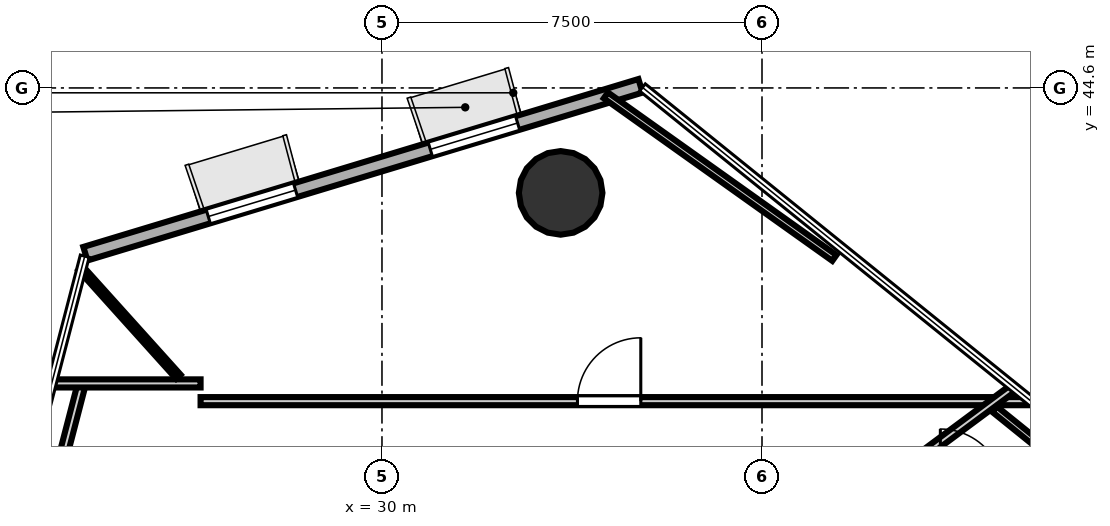
"""IFC4 building model, lengths in metres.
Left out: names, types, materials, properties, quantities, classifications, styles, units other than length and angle.
Written with IfcOpenShell. Run it as: python <this file> out.ifc"""

import sys

from ifc_helpers import new_model, si_unit, direction, frame, frame_2d, origin, origin_2d, place, context, subcontext, project, spatial, rectangle, hollow_circle, extrude, element, fill, save


model = new_model("IFC4")
c1 = context("Model", 3, precision=1e-05, world=origin(), true_north=direction((0.0, 1.0)))
c2 = subcontext(c1, "Body", "Model", "MODEL_VIEW")
j1 = project(units=[si_unit("LENGTHUNIT", "METRE"), si_unit("PLANEANGLEUNIT", "RADIAN")], contexts=[c1])
p1 = place(None, origin())
s1 = spatial("IfcSite", under=j1, at=p1, CompositionType="ELEMENT")
p2 = place(p1, origin())
s2 = spatial("IfcBuilding", under=s1, at=p2, CompositionType="ELEMENT")
p3 = place(p2, frame((0.0, 0.0, 82.1)))
s3 = spatial("IfcBuildingStorey", under=s2, at=p3, CompositionType="ELEMENT", Elevation=82.1)
p4 = place(p3, frame((33.526, 42.529, 0.0), z_axis=(0.0, 0.0, 1.0), x_axis=(1.0, 0.0, 0.0)))
e1 = element("IfcColumn", 1, at=p4, inside=s3, PredefinedType="COLUMN", context=c2, shape_type="SweptSolid", body=[
    extrude(hollow_circle(Radius=0.825, WallThickness=0.04, at=origin_2d()), origin(), (0.0, 0.0, 1.0), 3.7),
])
p5 = place(p3, frame((35.102, 44.642, 0.0), z_axis=(0.0, 0.0, 1.0), x_axis=(-0.957189300647, -0.289462679334, 0.0)))
e2 = element("IfcWall", 2, at=p5, inside=s3, PredefinedType="SOLIDWALL", context=c2, shape_type="SweptSolid", body=[
    extrude(rectangle(XDim=11.445, YDim=0.28, at=frame_2d((5.723, 0.0))), origin(), (0.0, 0.0, 1.0), 3.52),
])
p6 = place(p5, frame((2.534, 0.0, 0.85)))
e3 = element("IfcOpeningElement", 3, at=p6, cuts=e2, PredefinedType="OPENING", context=c2, shape_type="SweptSolid", body=[
    extrude(rectangle(XDim=1.8, YDim=2.1, at=frame_2d((0.9, 1.05))), frame((0.0, 0.15, 0.0), z_axis=(0.0, -1.0, 0.0), x_axis=(1.0, 0.0, 0.0)), (0.0, 0.0, 1.0), 0.3),
])
p7 = place(p5, frame((7.112, 0.0, 0.85)))
e4 = element("IfcOpeningElement", 4, at=p7, cuts=e2, PredefinedType="OPENING", context=c2, shape_type="SweptSolid", body=[
    extrude(rectangle(XDim=1.8, YDim=2.1, at=frame_2d((0.9, 1.05))), frame((0.0, 0.15, 0.0), z_axis=(0.0, -1.0, 0.0), x_axis=(1.0, 0.0, 0.0)), (0.0, 0.0, 1.0), 0.3),
])
p8 = place(p3, frame((23.58, 36.856, 0.0), z_axis=(0.0, 0.0, 1.0), x_axis=(0.251343413886, 0.967897974115, 0.0)))
e5 = element("IfcWall", 5, at=p8, inside=s3, PredefinedType="PARTITIONING", context=c2, shape_type="SweptSolid", body=[
    extrude(rectangle(XDim=2.0, YDim=0.16, at=frame_2d((1.0, 0.0))), origin(), (0.0, 0.0, 1.0), 2.84),
])
p9 = place(p3, frame((23.462, 38.769, 0.0), z_axis=(0.0, 0.0, 1.0), x_axis=(1.0, 0.0, 0.0)))
e6 = element("IfcWall", 6, at=p9, inside=s3, PredefinedType="PARTITIONING", context=c2, shape_type="SweptSolid", body=[
    extrude(rectangle(XDim=2.958, YDim=0.16, at=frame_2d((1.479, 0.0))), origin(), (0.0, 0.0, 1.0), 2.84),
])
p10 = place(p3, frame((26.42, 38.419, 0.0), z_axis=(0.0, 0.0, 1.0), x_axis=(1.0, 0.0, 0.0)))
e7 = element("IfcWall", 7, at=p10, inside=s3, PredefinedType="PARTITIONING", context=c2, shape_type="SweptSolid", body=[
    extrude(rectangle(XDim=16.41, YDim=0.16, at=frame_2d((8.205, 0.0))), origin(), (0.0, 0.0, 1.0), 2.798),
])
p11 = place(p10, frame((7.438, 0.0, 0.0)))
e8 = element("IfcOpeningElement", 8, at=p11, cuts=e7, PredefinedType="OPENING", context=c2, shape_type="SweptSolid", body=[
    extrude(rectangle(XDim=1.25, YDim=2.2, at=frame_2d((0.625, 1.1))), frame((0.0, 0.09, 0.0), z_axis=(0.0, -1.0, 0.0), x_axis=(1.0, 0.0, 0.0)), (0.0, 0.0, 1.0), 0.18),
])
p12 = place(p3, frame((42.49, 38.702, 0.0), z_axis=(0.0, 0.0, 1.0), x_axis=(-0.802811948591, -0.596232316467, 0.0)))
e9 = element("IfcWall", 9, at=p12, inside=s3, PredefinedType="PARTITIONING", context=c2, shape_type="SweptSolid", body=[
    extrude(rectangle(XDim=3.334, YDim=0.16, at=frame_2d((1.667, 0.0))), origin(), (0.0, 0.0, 1.0), 2.798),
])
p13 = place(p3, frame((42.09, 38.26, 0.0), z_axis=(0.0, 0.0, 1.0), x_axis=(0.778096949257, -0.628144201244, 0.0)))
e10 = element("IfcWall", 10, at=p13, inside=s3, PredefinedType="PARTITIONING", context=c2, shape_type="SweptSolid", body=[
    extrude(rectangle(XDim=8.014, YDim=0.14, at=frame_2d((4.007, 0.0))), origin(), (0.0, 0.0, 1.0), 2.798),
])
p14 = place(p3, frame((25.982, 38.901, 0.0), z_axis=(0.0, 0.0, 1.0), x_axis=(-0.669105172326, 0.743167725595, 0.0)))
e11 = element("IfcWall", 11, at=p14, inside=s3, PredefinedType="PARTITIONING", context=c2, shape_type="SweptSolid", body=[
    extrude(rectangle(XDim=2.881, YDim=0.12, at=frame_2d((1.44, 0.0))), origin(), (0.0, 0.0, 1.0), 2.84),
])
p15 = place(p3, frame((34.419, 44.452, 0.0), z_axis=(0.0, 0.0, 1.0), x_axis=(0.814826110471, -0.579705450806, 0.0)))
e12 = element("IfcWall", 12, at=p15, inside=s3, PredefinedType="PARTITIONING", context=c2, shape_type="SweptSolid", body=[
    extrude(rectangle(XDim=5.533, YDim=0.14, at=frame_2d((2.767, 0.0))), origin(), (0.0, 0.0, 1.0), 2.84),
])
p16 = place(p11, origin())
e13 = element("IfcDoor", 13, at=p16, inside=s3, OperationType="SINGLE_SWING_RIGHT", PredefinedType="DOOR", context=c2, shape_type="SweptSolid", body=[
    extrude(rectangle(XDim=1.25, YDim=2.2, at=frame_2d((0.625, 1.1))), frame((0.0, 0.025, 0.0), z_axis=(0.0, -1.0, 0.0), x_axis=(1.0, 0.0, 0.0)), (0.0, 0.0, 1.0), 0.05),
])
fill(e8, e13)
p17 = place(p6, origin())
e14 = element("IfcWindow", 14, at=p17, inside=s3, PartitioningType="SINGLE_PANEL", PredefinedType="WINDOW", context=c2, shape_type="SweptSolid", body=[
    extrude(rectangle(XDim=1.8, YDim=2.1, at=frame_2d((0.9, 1.05))), frame((0.0, 0.03, 0.0), z_axis=(0.0, -1.0, 0.0), x_axis=(1.0, 0.0, 0.0)), (0.0, 0.0, 1.0), 0.06),
])
fill(e3, e14)
p18 = place(p7, origin())
e15 = element("IfcWindow", 15, at=p18, inside=s3, PartitioningType="SINGLE_PANEL", PredefinedType="WINDOW", context=c2, shape_type="SweptSolid", body=[
    extrude(rectangle(XDim=1.8, YDim=2.1, at=frame_2d((0.9, 1.05))), frame((0.0, 0.03, 0.0), z_axis=(0.0, -1.0, 0.0), x_axis=(1.0, 0.0, 0.0)), (0.0, 0.0, 1.0), 0.06),
])
fill(e4, e15)
save(model, sys.argv[1])
